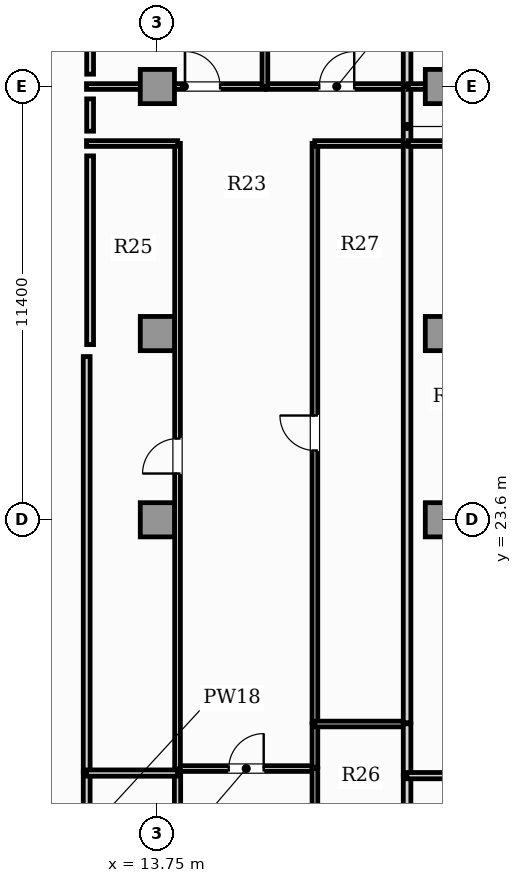
"""IFC4 building model, lengths in metres.
Left out: names, types, materials, properties, quantities, classifications, styles, units other than length and angle.
Written with IfcOpenShell. Run it as: python <this file> out.ifc"""

import sys

from ifc_helpers import new_model, si_unit, direction, frame, frame_2d, origin, origin_2d, place, context, subcontext, project, spatial, rectangle, extrude, element, fill, save


model = new_model("IFC4")
c1 = context("Model", 3, precision=1e-05, world=origin(), true_north=direction((0.0, 1.0)))
c2 = subcontext(c1, "Body", "Model", "MODEL_VIEW")
j1 = project(units=[si_unit("LENGTHUNIT", "METRE"), si_unit("PLANEANGLEUNIT", "RADIAN")], contexts=[c1])
p1 = place(None, origin())
s1 = spatial("IfcSite", under=j1, at=p1, CompositionType="ELEMENT")
p2 = place(p1, origin())
s2 = spatial("IfcBuilding", under=s1, at=p2, CompositionType="ELEMENT")
p3 = place(p2, frame((0.0, 0.0, 92.6)))
s3 = spatial("IfcBuildingStorey", under=s2, at=p3, CompositionType="ELEMENT", Elevation=92.6)
for number, where, z_axis, x_axis in (
    (1, (13.75, 23.6, 0.0), (0.0, 0.0, 1.0), (1.0, 0.0, 0.0)),
    (2, (21.25, 23.6, 0.0), (0.0, 0.0, 1.0), (1.0, 0.0, 0.0)),
    (3, (13.75, 28.5, 0.0), (0.0, 0.0, 1.0), (1.0, 0.0, 0.0)),
    (4, (21.25, 28.5, 0.0), (0.0, 0.0, 1.0), (1.0, 0.0, 0.0)),
    (5, (13.75, 35.0, 0.0), (0.0, 0.0, 1.0), (1.0, 0.0, 0.0)),
    (6, (21.25, 35.0, 0.0), (0.0, 0.0, 1.0), (1.0, 0.0, 0.0)),
):
    element("IfcColumn", number, at=place(p3, frame(where, z_axis=z_axis, x_axis=x_axis)), inside=s3, PredefinedType="COLUMN", context=c2, shape_type="SweptSolid", body=[
        extrude(rectangle(XDim=0.9, YDim=0.9, at=origin_2d()), origin(), (0.0, 0.0, 1.0), 3.85),
    ])
p4 = place(p3, frame((11.89, 13.765, 0.0), z_axis=(0.0, 0.0, 1.0), x_axis=(0.0, 1.0, 0.0)))
e7 = element("IfcWall", 7, at=p4, inside=s3, PredefinedType="PARTITIONING", context=c2, shape_type="SweptSolid", body=[
    extrude(rectangle(XDim=3.176, YDim=0.18, at=frame_2d((1.588, 0.0))), origin(), (0.0, 0.0, 1.0), 3.6),
])
p5 = place(p3, frame((11.89, 16.971, 0.0), z_axis=(0.0, 0.0, 1.0), x_axis=(0.0, 1.0, 0.0)))
e8 = element("IfcWall", 8, at=p5, inside=s3, PredefinedType="PARTITIONING", context=c2, shape_type="SweptSolid", body=[
    extrude(rectangle(XDim=10.924, YDim=0.18, at=frame_2d((5.462, 0.0))), origin(), (0.0, 0.0, 1.0), 3.6),
])
p6 = place(p3, frame((14.275, 17.054, 0.0), z_axis=(0.0, 0.0, 1.0), x_axis=(1.0, 0.0, 0.0)))
e9 = element("IfcWall", 9, at=p6, inside=s3, PredefinedType="PARTITIONING", context=c2, shape_type="SweptSolid", body=[
    extrude(rectangle(XDim=3.625, YDim=0.15, at=frame_2d((1.812, 0.0))), origin(), (0.0, 0.0, 1.0), 3.6),
])
p7 = place(p6, frame((1.353, 0.0, 0.0)))
e10 = element("IfcOpeningElement", 10, at=p7, cuts=e9, PredefinedType="OPENING", context=c2, shape_type="SweptSolid", body=[
    extrude(rectangle(XDim=0.92, YDim=2.1, at=frame_2d((0.46, 1.05))), frame((0.0, 0.085, 0.0), z_axis=(0.0, -1.0, 0.0), x_axis=(1.0, 0.0, 0.0)), (0.0, 0.0, 1.0), 0.17),
])
p8 = place(p3, frame((14.28, 13.765, 0.0), z_axis=(0.0, 0.0, 1.0), x_axis=(0.0, 1.0, 0.0)))
e11 = element("IfcWall", 11, at=p8, inside=s3, PredefinedType="PLUMBINGWALL", context=c2, shape_type="SweptSolid", body=[
    extrude(rectangle(XDim=3.176, YDim=0.165, at=frame_2d((1.588, 0.0))), origin(), (0.0, 0.0, 1.0), 3.6),
])
p9 = place(p8, frame((1.163, 0.0, 0.0)))
e12 = element("IfcOpeningElement", 12, at=p9, cuts=e11, PredefinedType="OPENING", context=c2, shape_type="SweptSolid", body=[
    extrude(rectangle(XDim=0.85, YDim=2.1, at=frame_2d((0.425, 1.05))), frame((0.0, 0.093, 0.0), z_axis=(0.0, -1.0, 0.0), x_axis=(1.0, 0.0, 0.0)), (0.0, 0.0, 1.0), 0.185),
])
p10 = place(p3, frame((17.895, 13.765, 0.0), z_axis=(0.0, 0.0, 1.0), x_axis=(0.0, 1.0, 0.0)))
e13 = element("IfcWall", 13, at=p10, inside=s3, PredefinedType="PARTITIONING", context=c2, shape_type="SweptSolid", body=[
    extrude(rectangle(XDim=3.294, YDim=0.15, at=frame_2d((1.647, 0.0))), origin(), (0.0, 0.0, 1.0), 3.6),
])
p11 = place(p10, frame((1.187, 0.0, 0.0)))
e14 = element("IfcOpeningElement", 14, at=p11, cuts=e13, PredefinedType="OPENING", context=c2, shape_type="SweptSolid", body=[
    extrude(rectangle(XDim=0.92, YDim=2.1, at=frame_2d((0.46, 1.05))), frame((0.0, 0.085, 0.0), z_axis=(0.0, -1.0, 0.0), x_axis=(1.0, 0.0, 0.0)), (0.0, 0.0, 1.0), 0.17),
])
p12 = place(p3, frame((14.28, 17.049, 0.0), z_axis=(0.0, 0.0, 1.0), x_axis=(0.0, 1.0, 0.0)))
e15 = element("IfcWall", 15, at=p12, inside=s3, PredefinedType="PARTITIONING", context=c2, shape_type="SweptSolid", body=[
    extrude(rectangle(XDim=16.456, YDim=0.15, at=frame_2d((8.228, 0.0))), origin(), (0.0, 0.0, 1.0), 3.6),
])
p13 = place(p12, frame((7.768, 0.0, 0.0)))
e16 = element("IfcOpeningElement", 16, at=p13, cuts=e15, PredefinedType="OPENING", context=c2, shape_type="SweptSolid", body=[
    extrude(rectangle(XDim=0.92, YDim=2.1, at=frame_2d((0.46, 1.05))), frame((0.0, 0.085, 0.0), z_axis=(0.0, -1.0, 0.0), x_axis=(1.0, 0.0, 0.0)), (0.0, 0.0, 1.0), 0.17),
])
p14 = place(p3, frame((11.885, 33.5, 0.0), z_axis=(0.0, 0.0, 1.0), x_axis=(1.0, 0.0, 0.0)))
e17 = element("IfcWall", 17, at=p14, inside=s3, PredefinedType="PARTITIONING", context=c2, shape_type="SweptSolid", body=[
    extrude(rectangle(XDim=2.4, YDim=0.15, at=frame_2d((1.2, 0.0))), origin(), (0.0, 0.0, 1.0), 3.6),
])
p15 = place(p3, frame((17.895, 17.089, 0.0), z_axis=(0.0, 0.0, 1.0), x_axis=(0.0, 1.0, 0.0)))
e18 = element("IfcWall", 18, at=p15, inside=s3, PredefinedType="PARTITIONING", context=c2, shape_type="SweptSolid", body=[
    extrude(rectangle(XDim=1.143, YDim=0.15, at=frame_2d((0.571, 0.0))), origin(), (0.0, 0.0, 1.0), 3.6),
])
p16 = place(p3, frame((17.895, 18.262, 0.0), z_axis=(0.0, 0.0, 1.0), x_axis=(0.0, 1.0, 0.0)))
e19 = element("IfcWall", 19, at=p16, inside=s3, PredefinedType="PARTITIONING", context=c2, shape_type="SweptSolid", body=[
    extrude(rectangle(XDim=15.243, YDim=0.15, at=frame_2d((7.622, 0.0))), origin(), (0.0, 0.0, 1.0), 3.6),
])
p17 = place(p16, frame((7.162, 0.0, 0.0)))
e20 = element("IfcOpeningElement", 20, at=p17, cuts=e19, PredefinedType="OPENING", context=c2, shape_type="SweptSolid", body=[
    extrude(rectangle(XDim=0.92, YDim=2.1, at=frame_2d((0.46, 1.05))), frame((0.0, 0.085, 0.0), z_axis=(0.0, -1.0, 0.0), x_axis=(1.0, 0.0, 0.0)), (0.0, 0.0, 1.0), 0.17),
])
p18 = place(p3, frame((17.89, 33.5, 0.0), z_axis=(0.0, 0.0, 1.0), x_axis=(1.0, 0.0, 0.0)))
e21 = element("IfcWall", 21, at=p18, inside=s3, PredefinedType="PARTITIONING", context=c2, shape_type="SweptSolid", body=[
    extrude(rectangle(XDim=2.435, YDim=0.15, at=frame_2d((1.217, 0.0))), origin(), (0.0, 0.0, 1.0), 3.6),
])
p19 = place(p3, frame((11.885, 35.0, 0.0), z_axis=(0.0, 0.0, 1.0), x_axis=(1.0, 0.0, 0.0)))
e22 = element("IfcWall", 22, at=p19, inside=s3, PredefinedType="PARTITIONING", context=c2, shape_type="SweptSolid", body=[
    extrude(rectangle(XDim=4.7, YDim=0.15, at=frame_2d((2.35, 0.0))), origin(), (0.0, 0.0, 1.0), 2.983),
])
p20 = place(p19, frame((2.595, 0.0, 0.0)))
e23 = element("IfcOpeningElement", 23, at=p20, cuts=e22, PredefinedType="OPENING", context=c2, shape_type="SweptSolid", body=[
    extrude(rectangle(XDim=0.92, YDim=2.1, at=frame_2d((0.46, 1.05))), frame((0.0, 0.085, 0.0), z_axis=(0.0, -1.0, 0.0), x_axis=(1.0, 0.0, 0.0)), (0.0, 0.0, 1.0), 0.17),
])
p21 = place(p3, frame((16.615, 35.0, 0.0), z_axis=(0.0, 0.0, 1.0), x_axis=(1.0, 0.0, 0.0)))
e24 = element("IfcWall", 24, at=p21, inside=s3, PredefinedType="PARTITIONING", context=c2, shape_type="SweptSolid", body=[
    extrude(rectangle(XDim=3.71, YDim=0.15, at=frame_2d((1.855, 0.0))), origin(), (0.0, 0.0, 1.0), 2.983),
])
p22 = place(p21, frame((1.395, 0.0, 0.0)))
e25 = element("IfcOpeningElement", 25, at=p22, cuts=e24, PredefinedType="OPENING", context=c2, shape_type="SweptSolid", body=[
    extrude(rectangle(XDim=0.92, YDim=2.1, at=frame_2d((0.46, 1.05))), frame((0.0, 0.085, 0.0), z_axis=(0.0, -1.0, 0.0), x_axis=(1.0, 0.0, 0.0)), (0.0, 0.0, 1.0), 0.17),
])
p23 = place(p3, frame((20.32, 33.495, 0.0), z_axis=(0.0, 0.0, 1.0), x_axis=(0.0, 1.0, 0.0)))
e26 = element("IfcWall", 26, at=p23, inside=s3, PredefinedType="PARTITIONING", context=c2, shape_type="SweptSolid", body=[
    extrude(rectangle(XDim=1.51, YDim=0.2, at=frame_2d((0.755, 0.0))), origin(), (0.0, 0.0, 1.0), 3.6),
])
p24 = place(p3, frame((11.885, 16.936, 0.0), z_axis=(0.0, 0.0, 1.0), x_axis=(1.0, 0.0, 0.0)))
e27 = element("IfcWall", 27, at=p24, inside=s3, PredefinedType="PLUMBINGWALL", context=c2, shape_type="SweptSolid", body=[
    extrude(rectangle(XDim=2.4, YDim=0.165, at=frame_2d((1.2, 0.0))), origin(), (0.0, 0.0, 1.0), 3.6),
])
p25 = place(p3, frame((17.89, 18.227, 0.0), z_axis=(0.0, 0.0, 1.0), x_axis=(1.0, 0.0, 0.0)))
e28 = element("IfcWall", 28, at=p25, inside=s3, PredefinedType="PARTITIONING", context=c2, shape_type="SweptSolid", body=[
    extrude(rectangle(XDim=2.435, YDim=0.15, at=frame_2d((1.217, 0.0))), origin(), (0.0, 0.0, 1.0), 3.6),
])
p26 = place(p3, frame((20.32, 13.765, 0.0), z_axis=(0.0, 0.0, 1.0), x_axis=(0.0, 1.0, 0.0)))
e29 = element("IfcWall", 29, at=p26, inside=s3, PredefinedType="PARTITIONING", context=c2, shape_type="SweptSolid", body=[
    extrude(rectangle(XDim=3.108, YDim=0.2, at=frame_2d((1.554, 0.0))), origin(), (0.0, 0.0, 1.0), 3.6),
])
p27 = place(p3, frame((20.32, 16.903, 0.0), z_axis=(0.0, 0.0, 1.0), x_axis=(0.0, 1.0, 0.0)))
e30 = element("IfcWall", 30, at=p27, inside=s3, PredefinedType="PARTITIONING", context=c2, shape_type="SweptSolid", body=[
    extrude(rectangle(XDim=1.329, YDim=0.2, at=frame_2d((0.664, 0.0))), origin(), (0.0, 0.0, 1.0), 3.6),
])
p28 = place(p3, frame((20.32, 18.262, 0.0), z_axis=(0.0, 0.0, 1.0), x_axis=(0.0, 1.0, 0.0)))
e31 = element("IfcWall", 31, at=p28, inside=s3, PredefinedType="PARTITIONING", context=c2, shape_type="SweptSolid", body=[
    extrude(rectangle(XDim=15.203, YDim=0.2, at=frame_2d((7.602, 0.0))), origin(), (0.0, 0.0, 1.0), 3.6),
])
p29 = place(p3, frame((16.58, 34.995, 0.0), z_axis=(0.0, 0.0, 1.0), x_axis=(0.0, 1.0, 0.0)))
e32 = element("IfcWall", 32, at=p29, inside=s3, PredefinedType="PARTITIONING", context=c2, shape_type="SweptSolid", body=[
    extrude(rectangle(XDim=7.995, YDim=0.15, at=frame_2d((3.998, 0.0))), origin(), (0.0, 0.0, 1.0), 3.6),
])
p30 = place(p3, frame((20.32, 35.035, 0.0), z_axis=(0.0, 0.0, 1.0), x_axis=(0.0, 1.0, 0.0)))
e33 = element("IfcWall", 33, at=p30, inside=s3, PredefinedType="PARTITIONING", context=c2, shape_type="SweptSolid", body=[
    extrude(rectangle(XDim=7.955, YDim=0.2, at=frame_2d((3.978, 0.0))), origin(), (0.0, 0.0, 1.0), 3.6),
])
p31 = place(p3, frame((20.355, 33.5, 0.0), z_axis=(0.0, 0.0, 1.0), x_axis=(1.0, 0.0, 0.0)))
e34 = element("IfcWall", 34, at=p31, inside=s3, PredefinedType="PARTITIONING", context=c2, shape_type="SweptSolid", body=[
    extrude(rectangle(XDim=2.412, YDim=0.15, at=frame_2d((1.206, 0.0))), origin(), (0.0, 0.0, 1.0), 3.6),
])
p32 = place(p3, frame((20.355, 35.0, 0.0), z_axis=(0.0, 0.0, 1.0), x_axis=(1.0, 0.0, 0.0)))
e35 = element("IfcWall", 35, at=p32, inside=s3, PredefinedType="PARTITIONING", context=c2, shape_type="SweptSolid", body=[
    extrude(rectangle(XDim=4.66, YDim=0.15, at=frame_2d((2.33, 0.0))), origin(), (0.0, 0.0, 1.0), 2.983),
])
p33 = place(p32, frame((1.87, 0.0, 0.0)))
e36 = element("IfcOpeningElement", 36, at=p33, cuts=e35, PredefinedType="OPENING", context=c2, shape_type="SweptSolid", body=[
    extrude(rectangle(XDim=0.92, YDim=2.1, at=frame_2d((0.46, 1.05))), frame((0.0, 0.085, 0.0), z_axis=(0.0, -1.0, 0.0), x_axis=(1.0, 0.0, 0.0)), (0.0, 0.0, 1.0), 0.17),
])
p34 = place(p3, frame((20.315, 16.868, 0.0), z_axis=(0.0, 0.0, 1.0), x_axis=(1.0, 0.0, 0.0)))
e37 = element("IfcWall", 37, at=p34, inside=s3, PredefinedType="PLUMBINGWALL", context=c2, shape_type="SweptSolid", body=[
    extrude(rectangle(XDim=2.452, YDim=0.165, at=frame_2d((1.226, 0.0))), origin(), (0.0, 0.0, 1.0), 3.6),
])
p35 = place(p3, frame((11.98, 33.825, 0.0), z_axis=(0.0, 0.0, 1.0), x_axis=(0.0, 1.0, 0.0)))
e38 = element("IfcWall", 38, at=p35, inside=s3, PredefinedType="PARTITIONING", context=c2, shape_type="SweptSolid", body=[
    extrude(rectangle(XDim=0.85, YDim=0.18, at=frame_2d((0.425, 0.0))), origin(), (0.0, 0.0, 1.0), 3.6),
])
p36 = place(p3, frame((11.98, 28.21, 0.0), z_axis=(0.0, 0.0, 1.0), x_axis=(0.0, 1.0, 0.0)))
e39 = element("IfcWall", 39, at=p36, inside=s3, PredefinedType="PARTITIONING", context=c2, shape_type="SweptSolid", body=[
    extrude(rectangle(XDim=4.965, YDim=0.18, at=frame_2d((2.482, 0.0))), origin(), (0.0, 0.0, 1.0), 3.6),
])
p37 = place(p3, frame((11.98, 35.325, 0.0), z_axis=(0.0, 0.0, 1.0), x_axis=(0.0, 1.0, 0.0)))
e40 = element("IfcWall", 40, at=p37, inside=s3, PredefinedType="PARTITIONING", context=c2, shape_type="SweptSolid", body=[
    extrude(rectangle(XDim=7.665, YDim=0.18, at=frame_2d((3.833, 0.0))), origin(), (0.0, 0.0, 1.0), 3.6),
])
p38 = place(p7, origin())
e41 = element("IfcDoor", 41, at=p38, inside=s3, OperationType="SINGLE_SWING_RIGHT", PredefinedType="DOOR", context=c2, shape_type="SweptSolid", body=[
    extrude(rectangle(XDim=0.92, YDim=2.1, at=frame_2d((0.46, 1.05))), frame((0.0, 0.025, 0.0), z_axis=(0.0, -1.0, 0.0), x_axis=(1.0, 0.0, 0.0)), (0.0, 0.0, 1.0), 0.05),
])
fill(e10, e41)
p39 = place(p13, origin())
e42 = element("IfcDoor", 42, at=p39, inside=s3, OperationType="SINGLE_SWING_LEFT", PredefinedType="DOOR", context=c2, shape_type="SweptSolid", body=[
    extrude(rectangle(XDim=0.92, YDim=2.1, at=frame_2d((0.46, 1.05))), frame((0.0, 0.025, 0.0), z_axis=(0.0, -1.0, 0.0), x_axis=(1.0, 0.0, 0.0)), (0.0, 0.0, 1.0), 0.05),
])
fill(e16, e42)
p40 = place(p17, origin())
e43 = element("IfcDoor", 43, at=p40, inside=s3, OperationType="SINGLE_SWING_RIGHT", PredefinedType="DOOR", context=c2, shape_type="SweptSolid", body=[
    extrude(rectangle(XDim=0.92, YDim=2.1, at=frame_2d((0.46, 1.05))), frame((0.0, 0.025, 0.0), z_axis=(0.0, -1.0, 0.0), x_axis=(1.0, 0.0, 0.0)), (0.0, 0.0, 1.0), 0.05),
])
fill(e20, e43)
p41 = place(p20, origin())
e44 = element("IfcDoor", 44, at=p41, inside=s3, OperationType="SINGLE_SWING_LEFT", PredefinedType="DOOR", context=c2, shape_type="SweptSolid", body=[
    extrude(rectangle(XDim=0.92, YDim=2.1, at=frame_2d((0.46, 1.05))), frame((0.0, 0.025, 0.0), z_axis=(0.0, -1.0, 0.0), x_axis=(1.0, 0.0, 0.0)), (0.0, 0.0, 1.0), 0.05),
])
fill(e23, e44)
p42 = place(p22, origin())
e45 = element("IfcDoor", 45, at=p42, inside=s3, OperationType="SINGLE_SWING_RIGHT", PredefinedType="DOOR", context=c2, shape_type="SweptSolid", body=[
    extrude(rectangle(XDim=0.92, YDim=2.1, at=frame_2d((0.46, 1.05))), frame((0.0, 0.025, 0.0), z_axis=(0.0, -1.0, 0.0), x_axis=(1.0, 0.0, 0.0)), (0.0, 0.0, 1.0), 0.05),
])
fill(e25, e45)
save(model, sys.argv[1])
